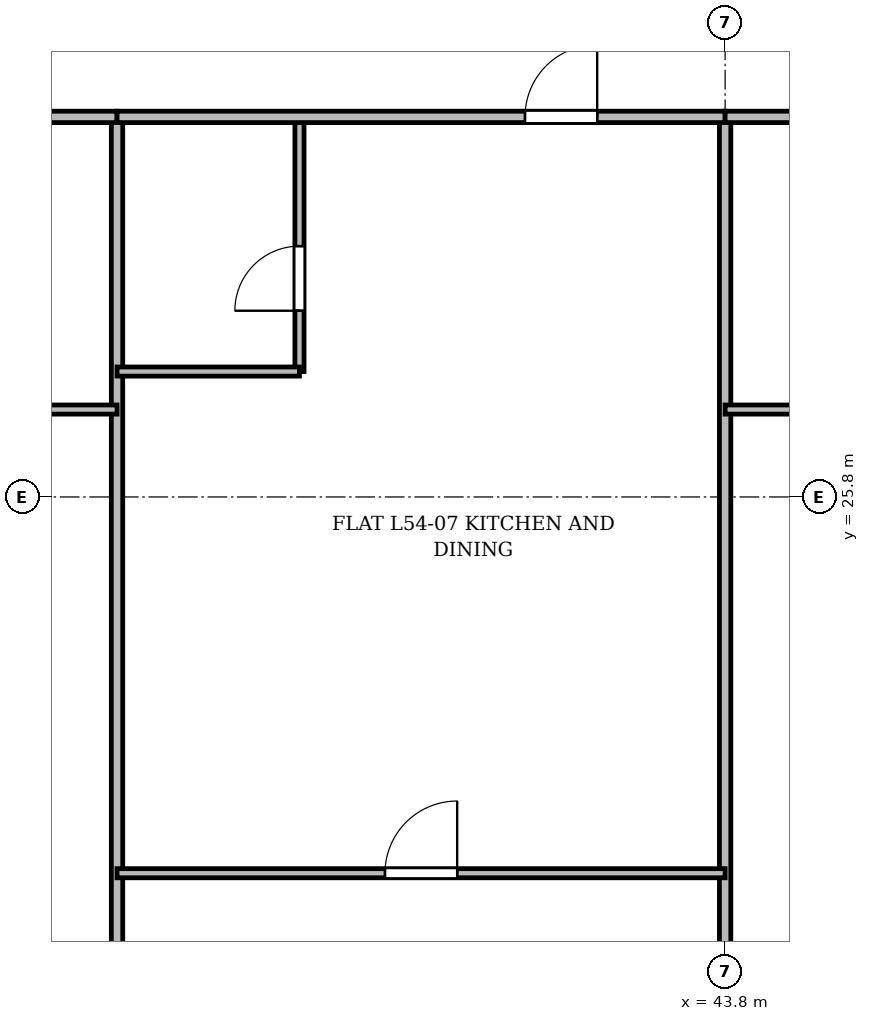
"""IFC4 building model, lengths in metres.
Left out: names, types, materials, properties, quantities, classifications, styles, units other than length and angle.
Written with IfcOpenShell. Run it as: python <this file> out.ifc"""

import sys

from ifc_helpers import new_model, si_unit, direction, frame, frame_2d, origin, place, context, subcontext, project, spatial, rectangle, extrude, source, transform, mapped, element, fill, save


model = new_model("IFC4")
c1 = context("Model", 3, precision=1e-05, world=origin(), true_north=direction((0.0, 1.0)))
c2 = subcontext(c1, "Body", "Model", "MODEL_VIEW")
j1 = project(units=[si_unit("LENGTHUNIT", "METRE"), si_unit("PLANEANGLEUNIT", "RADIAN")], contexts=[c1])
p1 = place(None, origin())
s1 = spatial("IfcSite", under=j1, at=p1, CompositionType="ELEMENT")
p2 = place(p1, origin())
s2 = spatial("IfcBuilding", under=s1, at=p2, CompositionType="ELEMENT")
p3 = place(p2, frame((0.0, 0.0, 208.5)))
s3 = spatial("IfcBuildingStorey", under=s2, at=p3, CompositionType="ELEMENT", Elevation=208.5)
p4 = place(p3, frame((35.8, 3.625, 0.0), z_axis=(0.0, 0.0, 1.0), x_axis=(0.0, 1.0, 0.0)))
e1 = element("IfcWall", 1, at=p4, inside=s3, PredefinedType="PARTITIONING", context=c2, shape_type="SweptSolid", body=[
    extrude(rectangle(XDim=27.175, YDim=0.15, at=frame_2d((13.587, 0.0))), origin(), (0.0, 0.0, 1.0), 2.91),
])
p5 = place(p3, frame((43.8, 3.625, 0.0), z_axis=(0.0, 0.0, 1.0), x_axis=(0.0, 1.0, 0.0)))
e2 = element("IfcWall", 2, at=p5, inside=s3, PredefinedType="PARTITIONING", context=c2, shape_type="SweptSolid", body=[
    extrude(rectangle(XDim=27.175, YDim=0.15, at=frame_2d((13.587, 0.0))), origin(), (0.0, 0.0, 1.0), 2.86),
])
p6 = place(p3, frame((30.6, 30.8, 0.0), z_axis=(0.0, 0.0, 1.0), x_axis=(1.0, 0.0, 0.0)))
e3 = element("IfcWall", 3, at=p6, inside=s3, PredefinedType="PARTITIONING", context=c2, shape_type="SweptSolid", body=[
    extrude(rectangle(XDim=5.2, YDim=0.15, at=frame_2d((2.6, 0.0))), origin(), (0.0, 0.0, 1.0), 2.86),
])
p7 = place(p6, frame((2.033, 0.0, 0.0)))
e4 = element("IfcOpeningElement", 4, at=p7, cuts=e3, PredefinedType="OPENING", context=c2, shape_type="SweptSolid", body=[
    extrude(rectangle(XDim=0.95, YDim=2.15, at=frame_2d((0.475, 1.075))), frame((0.0, 0.085, 0.0), z_axis=(0.0, -1.0, 0.0), x_axis=(1.0, 0.0, 0.0)), (0.0, 0.0, 1.0), 0.17),
])
p8 = place(p3, frame((30.6, 26.95, 0.0), z_axis=(0.0, 0.0, 1.0), x_axis=(1.0, 0.0, 0.0)))
e5 = element("IfcWall", 5, at=p8, inside=s3, PredefinedType="PARTITIONING", context=c2, shape_type="SweptSolid", body=[
    extrude(rectangle(XDim=5.2, YDim=0.12, at=frame_2d((2.6, 0.0))), origin(), (0.0, 0.0, 1.0), 2.86),
])
p9 = place(p8, frame((2.033, 0.0, 0.0)))
e6 = element("IfcOpeningElement", 6, at=p9, cuts=e5, PredefinedType="OPENING", context=c2, shape_type="SweptSolid", body=[
    extrude(rectangle(XDim=0.95, YDim=2.15, at=frame_2d((0.475, 1.075))), frame((0.0, 0.07, 0.0), z_axis=(0.0, -1.0, 0.0), x_axis=(1.0, 0.0, 0.0)), (0.0, 0.0, 1.0), 0.14),
])
p10 = place(p3, frame((35.8, 20.85, 0.0), z_axis=(0.0, 0.0, 1.0), x_axis=(1.0, 0.0, 0.0)))
e7 = element("IfcWall", 7, at=p10, inside=s3, PredefinedType="PARTITIONING", context=c2, shape_type="SweptSolid", body=[
    extrude(rectangle(XDim=8.0, YDim=0.12, at=frame_2d((4.0, 0.0))), origin(), (0.0, 0.0, 1.0), 2.86),
])
p11 = place(p10, frame((3.525, 0.0, 0.0)))
e8 = element("IfcOpeningElement", 8, at=p11, cuts=e7, PredefinedType="OPENING", context=c2, shape_type="SweptSolid", body=[
    extrude(rectangle(XDim=0.95, YDim=2.15, at=frame_2d((0.475, 1.075))), frame((0.0, 0.07, 0.0), z_axis=(0.0, -1.0, 0.0), x_axis=(1.0, 0.0, 0.0)), (0.0, 0.0, 1.0), 0.14),
])
p12 = place(p3, frame((38.2, 27.45, 0.0), z_axis=(0.0, 0.0, 1.0), x_axis=(0.0, 1.0, 0.0)))
e9 = element("IfcWall", 9, at=p12, inside=s3, PredefinedType="PARTITIONING", context=c2, shape_type="SweptSolid", body=[
    extrude(rectangle(XDim=3.35, YDim=0.12, at=frame_2d((1.675, 0.0))), origin(), (0.0, 0.0, 1.0), 3.36),
])
p13 = place(p12, frame((0.8, 0.0, 0.0)))
e10 = element("IfcOpeningElement", 10, at=p13, cuts=e9, PredefinedType="OPENING", context=c2, shape_type="SweptSolid", body=[
    extrude(rectangle(XDim=0.85, YDim=2.1, at=frame_2d((0.425, 1.05))), frame((0.0, 0.07, 0.0), z_axis=(0.0, -1.0, 0.0), x_axis=(1.0, 0.0, 0.0)), (0.0, 0.0, 1.0), 0.14),
])
p14 = place(p3, frame((35.8, 27.45, 0.0), z_axis=(0.0, 0.0, 1.0), x_axis=(1.0, 0.0, 0.0)))
e11 = element("IfcWall", 11, at=p14, inside=s3, PredefinedType="PARTITIONING", context=c2, shape_type="SweptSolid", body=[
    extrude(rectangle(XDim=2.4, YDim=0.12, at=frame_2d((1.2, 0.0))), origin(), (0.0, 0.0, 1.0), 3.36),
])
p15 = place(p3, frame((35.8, 30.8, 0.0), z_axis=(0.0, 0.0, 1.0), x_axis=(1.0, 0.0, 0.0)))
e12 = element("IfcWall", 12, at=p15, inside=s3, PredefinedType="PARTITIONING", context=c2, shape_type="SweptSolid", body=[
    extrude(rectangle(XDim=8.0, YDim=0.15, at=frame_2d((4.0, 0.0))), origin(), (0.0, 0.0, 1.0), 2.86),
])
p16 = place(p15, frame((5.367, 0.0, 0.0)))
e13 = element("IfcOpeningElement", 13, at=p16, cuts=e12, PredefinedType="OPENING", context=c2, shape_type="SweptSolid", body=[
    extrude(rectangle(XDim=0.95, YDim=2.15, at=frame_2d((0.475, 1.075))), frame((0.0, 0.085, 0.0), z_axis=(0.0, -1.0, 0.0), x_axis=(1.0, 0.0, 0.0)), (0.0, 0.0, 1.0), 0.17),
])
p17 = place(p3, frame((43.8, 30.8, 0.0), z_axis=(0.0, 0.0, 1.0), x_axis=(1.0, 0.0, 0.0)))
e14 = element("IfcWall", 14, at=p17, inside=s3, PredefinedType="PARTITIONING", context=c2, shape_type="SweptSolid", body=[
    extrude(rectangle(XDim=7.2, YDim=0.15, at=frame_2d((3.6, 0.0))), origin(), (0.0, 0.0, 1.0), 2.86),
])
p18 = place(p17, frame((3.125, 0.0, 0.0)))
e15 = element("IfcOpeningElement", 15, at=p18, cuts=e14, PredefinedType="OPENING", context=c2, shape_type="SweptSolid", body=[
    extrude(rectangle(XDim=0.95, YDim=2.15, at=frame_2d((0.475, 1.075))), frame((0.0, 0.085, 0.0), z_axis=(0.0, -1.0, 0.0), x_axis=(1.0, 0.0, 0.0)), (0.0, 0.0, 1.0), 0.17),
])
p19 = place(p3, frame((43.8, 26.95, 0.0), z_axis=(0.0, 0.0, 1.0), x_axis=(1.0, 0.0, 0.0)))
e16 = element("IfcWall", 16, at=p19, inside=s3, PredefinedType="PARTITIONING", context=c2, shape_type="SweptSolid", body=[
    extrude(rectangle(XDim=7.2, YDim=0.12, at=frame_2d((3.6, 0.0))), origin(), (0.0, 0.0, 1.0), 2.86),
])
p20 = place(p19, frame((3.125, 0.0, 0.0)))
e17 = element("IfcOpeningElement", 17, at=p20, cuts=e16, PredefinedType="OPENING", context=c2, shape_type="SweptSolid", body=[
    extrude(rectangle(XDim=0.95, YDim=2.15, at=frame_2d((0.475, 1.075))), frame((0.0, 0.07, 0.0), z_axis=(0.0, -1.0, 0.0), x_axis=(1.0, 0.0, 0.0)), (0.0, 0.0, 1.0), 0.14),
])
m1 = source(origin(), c2, "Body", "SweptSolid", [
    extrude(rectangle(XDim=0.95, YDim=2.15, at=frame_2d((0.475, 1.075))), frame((0.0, 0.025, 0.0), z_axis=(0.0, -1.0, 0.0), x_axis=(1.0, 0.0, 0.0)), (0.0, 0.0, 1.0), 0.05),
])
p21 = place(p11, origin())
e18 = element("IfcDoor", 18, at=p21, inside=s3, OperationType="SINGLE_SWING_RIGHT", PredefinedType="DOOR", context=c2, shape_type="MappedRepresentation", body=[
    mapped(m1, transform((0.0, 0.0, 0.0), x_axis=(1.0, 0.0, 0.0), y_axis=(0.0, 1.0, 0.0), z_axis=(0.0, 0.0, 1.0), scale=1.0)),
])
fill(e8, e18)
m2 = source(origin(), c2, "Body", "SweptSolid", [
    extrude(rectangle(XDim=0.85, YDim=2.1, at=frame_2d((0.425, 1.05))), frame((0.0, 0.025, 0.0), z_axis=(0.0, -1.0, 0.0), x_axis=(1.0, 0.0, 0.0)), (0.0, 0.0, 1.0), 0.05),
])
p22 = place(p13, origin())
e19 = element("IfcDoor", 19, at=p22, inside=s3, OperationType="SINGLE_SWING_LEFT", PredefinedType="DOOR", context=c2, shape_type="MappedRepresentation", body=[
    mapped(m2, transform((0.0, 0.0, 0.0), x_axis=(1.0, 0.0, 0.0), y_axis=(0.0, 1.0, 0.0), z_axis=(0.0, 0.0, 1.0), scale=1.0)),
])
fill(e10, e19)
p23 = place(p16, origin())
e20 = element("IfcDoor", 20, at=p23, inside=s3, OperationType="SINGLE_SWING_RIGHT", PredefinedType="DOOR", context=c2, shape_type="MappedRepresentation", body=[
    mapped(m1, transform((0.0, 0.0, 0.0), x_axis=(1.0, 0.0, 0.0), y_axis=(0.0, 1.0, 0.0), z_axis=(0.0, 0.0, 1.0), scale=1.0)),
])
fill(e13, e20)
save(model, sys.argv[1])
